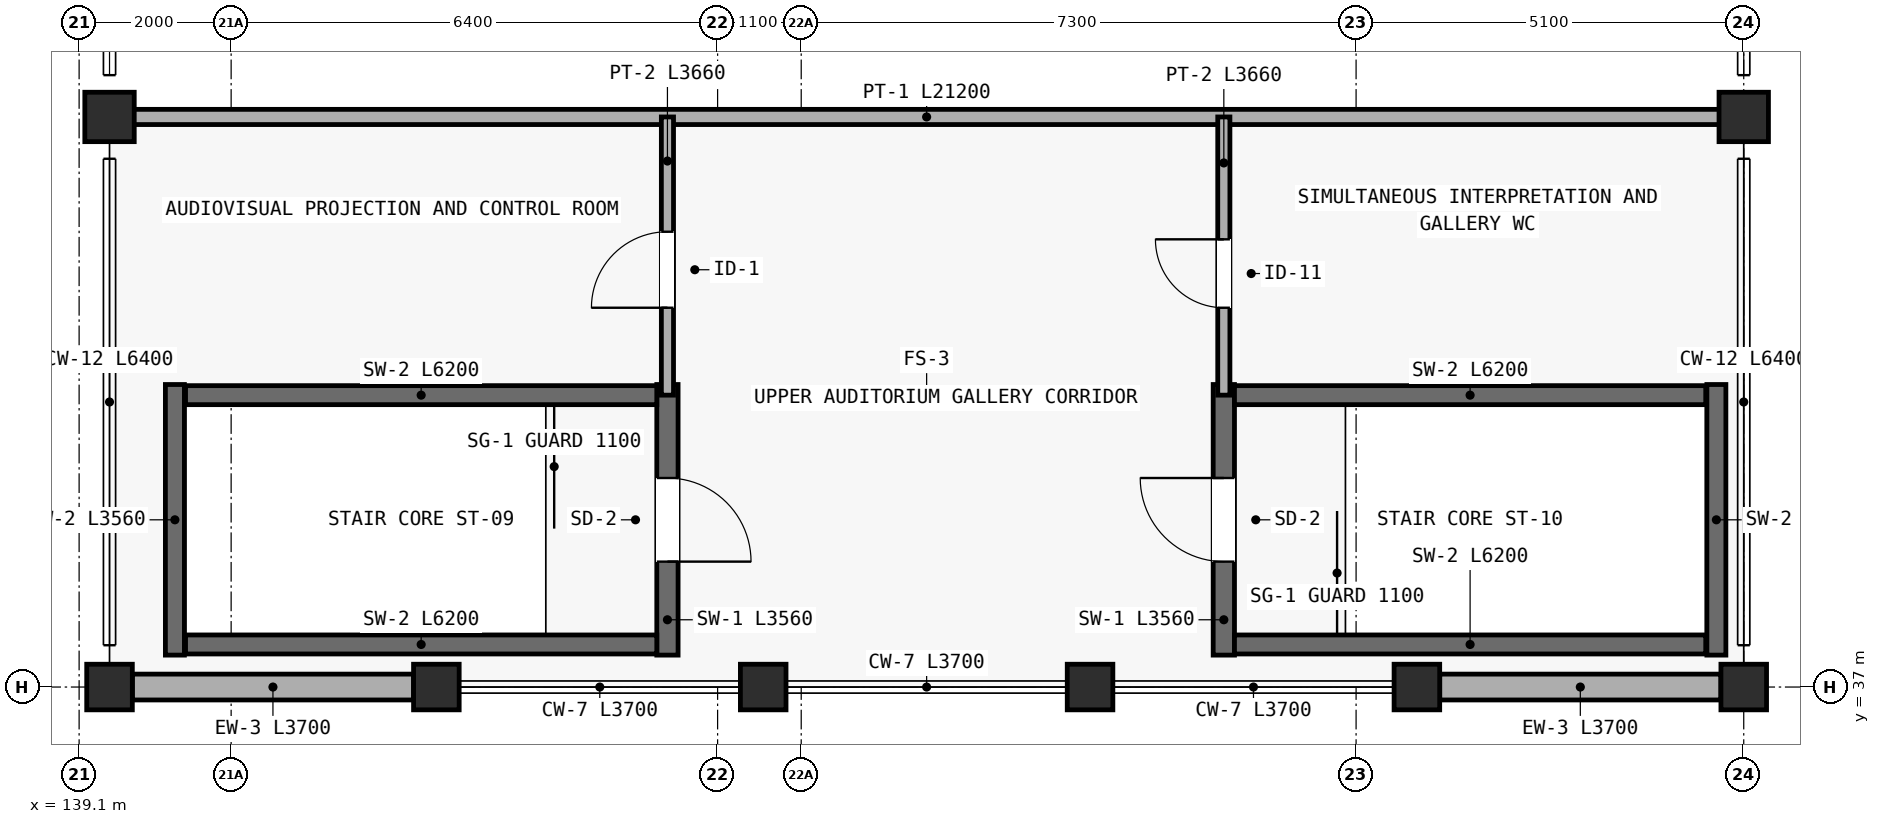
"""IFC4 building model, lengths in metres.
Left out: names, types, materials, properties, quantities, classifications, styles, units other than length and angle.
Written with IfcOpenShell. Run it as: python <this file> out.ifc"""

import sys

from ifc_helpers import new_model, si_unit, direction, frame, frame_2d, origin, origin_2d, place, context, subcontext, project, spatial, rectangle, extrude, element, fill, save


model = new_model("IFC4")
c1 = context("Model", 3, precision=1e-05, world=origin(), true_north=direction((0.0, 1.0)))
c2 = subcontext(c1, "Body", "Model", "MODEL_VIEW")
j1 = project(units=[si_unit("LENGTHUNIT", "METRE"), si_unit("PLANEANGLEUNIT", "RADIAN")], contexts=[c1])
p1 = place(None, origin())
s1 = spatial("IfcSite", under=j1, at=p1, CompositionType="ELEMENT")
p2 = place(p1, origin())
s2 = spatial("IfcBuilding", under=s1, at=p2, CompositionType="ELEMENT")
p3 = place(p2, frame((0.0, 0.0, 5.85)))
s3 = spatial("IfcBuildingStorey", under=s2, at=p3, CompositionType="ELEMENT", Elevation=5.85)
for number, where, z_axis, x_axis in (
    (1, (139.5, 37.0, 0.0), (0.0, 0.0, 1.0), (1.0, 0.0, 0.0)),
    (2, (143.8, 37.0, 0.0), (0.0, 0.0, 1.0), (1.0, 0.0, 0.0)),
    (3, (148.1, 37.0, 0.0), (0.0, 0.0, 1.0), (1.0, 0.0, 0.0)),
    (4, (152.4, 37.0, 0.0), (0.0, 0.0, 1.0), (1.0, 0.0, 0.0)),
    (5, (156.7, 37.0, 0.0), (0.0, 0.0, 1.0), (1.0, 0.0, 0.0)),
    (6, (161.0, 37.0, 0.0), (0.0, 0.0, 1.0), (1.0, 0.0, 0.0)),
):
    element("IfcColumn", number, at=place(p3, frame(where, z_axis=z_axis, x_axis=x_axis)), inside=s3, PredefinedType="COLUMN", context=c2, shape_type="SweptSolid", body=[
        extrude(rectangle(XDim=0.6, YDim=0.6, at=origin_2d()), origin(), (0.0, 0.0, 1.0), 3.45),
    ])
for number, where, z_axis, x_axis in (
    (7, (139.5, 44.5, 0.0), (0.0, 0.0, 1.0), (1.0, 0.0, 0.0)),
    (8, (161.0, 44.5, 0.0), (0.0, 0.0, 1.0), (1.0, 0.0, 0.0)),
):
    element("IfcColumn", number, at=place(p3, frame(where, z_axis=z_axis, x_axis=x_axis)), inside=s3, PredefinedType="COLUMN", context=c2, shape_type="SweptSolid", body=[
        extrude(rectangle(XDim=0.65, YDim=0.65, at=origin_2d()), origin(), (0.0, 0.0, 1.0), 3.45),
    ])
for number, where, z_axis, x_axis in (
    (9, (139.8, 37.0, 0.0), (0.0, 0.0, 1.0), (1.0, 0.0, 0.0)),
    (10, (157.0, 37.0, 0.0), (0.0, 0.0, 1.0), (1.0, 0.0, 0.0)),
):
    element("IfcWall", number, at=place(p3, frame(where, z_axis=z_axis, x_axis=x_axis)), inside=s3, PredefinedType="STANDARD", context=c2, shape_type="SweptSolid", body=[
        extrude(rectangle(XDim=3.7, YDim=0.34, at=frame_2d((1.85, 0.0))), origin(), (0.0, 0.0, 1.0), 2.5),
    ])
p4 = place(p3, frame((146.84, 40.98, 0.0), z_axis=(0.0, 0.0, 1.0), x_axis=(0.0, -1.0, 0.0)))
e11 = element("IfcWall", 11, at=p4, inside=s3, PredefinedType="SHEAR", context=c2, shape_type="SweptSolid", body=[
    extrude(rectangle(XDim=3.56, YDim=0.28, at=frame_2d((1.78, 0.0))), origin(), (0.0, 0.0, 1.0), 3.3),
])
p5 = place(p4, frame((1.23, 0.0, 0.0)))
e12 = element("IfcOpeningElement", 12, at=p5, cuts=e11, PredefinedType="OPENING", context=c2, shape_type="SweptSolid", body=[
    extrude(rectangle(XDim=1.1, YDim=2.15, at=frame_2d((0.55, 1.075))), frame((0.0, 0.15, 0.0), z_axis=(0.0, -1.0, 0.0), x_axis=(1.0, 0.0, 0.0)), (0.0, 0.0, 1.0), 0.3),
])
p6 = place(p3, frame((140.36, 37.42, 0.0), z_axis=(0.0, 0.0, 1.0), x_axis=(0.0, 1.0, 0.0)))
e13 = element("IfcWall", 13, at=p6, inside=s3, PredefinedType="SHEAR", context=c2, shape_type="SweptSolid", body=[
    extrude(rectangle(XDim=3.56, YDim=0.25, at=frame_2d((1.78, 0.0))), origin(), (0.0, 0.0, 1.0), 3.3),
])
for number, where, z_axis, x_axis in (
    (14, (146.7, 40.84, 0.0), (0.0, 0.0, 1.0), (-1.0, 0.0, 0.0)),
    (15, (140.5, 37.56, 0.0), (0.0, 0.0, 1.0), (1.0, 0.0, 0.0)),
):
    element("IfcWall", number, at=place(p3, frame(where, z_axis=z_axis, x_axis=x_axis)), inside=s3, PredefinedType="SHEAR", context=c2, shape_type="SweptSolid", body=[
        extrude(rectangle(XDim=6.2, YDim=0.25, at=frame_2d((3.1, 0.0))), origin(), (0.0, 0.0, 1.0), 3.3),
    ])
p7 = place(p3, frame((154.16, 37.42, 0.0), z_axis=(0.0, 0.0, 1.0), x_axis=(0.0, 1.0, 0.0)))
e16 = element("IfcWall", 16, at=p7, inside=s3, PredefinedType="SHEAR", context=c2, shape_type="SweptSolid", body=[
    extrude(rectangle(XDim=3.56, YDim=0.28, at=frame_2d((1.78, 0.0))), origin(), (0.0, 0.0, 1.0), 3.3),
])
p8 = place(p7, frame((1.23, 0.0, 0.0)))
e17 = element("IfcOpeningElement", 17, at=p8, cuts=e16, PredefinedType="OPENING", context=c2, shape_type="SweptSolid", body=[
    extrude(rectangle(XDim=1.1, YDim=2.15, at=frame_2d((0.55, 1.075))), frame((0.0, 0.15, 0.0), z_axis=(0.0, -1.0, 0.0), x_axis=(1.0, 0.0, 0.0)), (0.0, 0.0, 1.0), 0.3),
])
p9 = place(p3, frame((160.64, 40.98, 0.0), z_axis=(0.0, 0.0, 1.0), x_axis=(0.0, -1.0, 0.0)))
e18 = element("IfcWall", 18, at=p9, inside=s3, PredefinedType="SHEAR", context=c2, shape_type="SweptSolid", body=[
    extrude(rectangle(XDim=3.56, YDim=0.25, at=frame_2d((1.78, 0.0))), origin(), (0.0, 0.0, 1.0), 3.3),
])
for number, where, z_axis, x_axis in (
    (19, (154.3, 37.56, 0.0), (0.0, 0.0, 1.0), (1.0, 0.0, 0.0)),
    (20, (160.5, 40.84, 0.0), (0.0, 0.0, 1.0), (-1.0, 0.0, 0.0)),
):
    element("IfcWall", number, at=place(p3, frame(where, z_axis=z_axis, x_axis=x_axis)), inside=s3, PredefinedType="SHEAR", context=c2, shape_type="SweptSolid", body=[
        extrude(rectangle(XDim=6.2, YDim=0.25, at=frame_2d((3.1, 0.0))), origin(), (0.0, 0.0, 1.0), 3.3),
    ])
p10 = place(p3, frame((139.65, 44.5, 0.0), z_axis=(0.0, 0.0, 1.0), x_axis=(1.0, 0.0, 0.0)))
e21 = element("IfcWall", 21, at=p10, inside=s3, PredefinedType="PARTITIONING", context=c2, shape_type="SweptSolid", body=[
    extrude(rectangle(XDim=21.2, YDim=0.2, at=frame_2d((10.6, 0.0))), origin(), (0.0, 0.0, 1.0), 2.5),
])
p11 = place(p3, frame((146.84, 40.84, 0.0), z_axis=(0.0, 0.0, 1.0), x_axis=(0.0, 1.0, 0.0)))
e22 = element("IfcWall", 22, at=p11, inside=s3, PredefinedType="PARTITIONING", context=c2, shape_type="SweptSolid", body=[
    extrude(rectangle(XDim=3.66, YDim=0.16, at=frame_2d((1.83, 0.0))), origin(), (0.0, 0.0, 1.0), 2.5),
])
p12 = place(p11, frame((1.15, 0.0, 0.0)))
e23 = element("IfcOpeningElement", 23, at=p12, cuts=e22, PredefinedType="OPENING", context=c2, shape_type="SweptSolid", body=[
    extrude(rectangle(XDim=1.0, YDim=2.12, at=frame_2d((0.5, 1.06))), frame((0.0, 0.09, 0.0), z_axis=(0.0, -1.0, 0.0), x_axis=(1.0, 0.0, 0.0)), (0.0, 0.0, 1.0), 0.18),
])
p13 = place(p3, frame((154.16, 40.84, 0.0), z_axis=(0.0, 0.0, 1.0), x_axis=(0.0, 1.0, 0.0)))
e24 = element("IfcWall", 24, at=p13, inside=s3, PredefinedType="PARTITIONING", context=c2, shape_type="SweptSolid", body=[
    extrude(rectangle(XDim=3.66, YDim=0.16, at=frame_2d((1.83, 0.0))), origin(), (0.0, 0.0, 1.0), 2.5),
])
p14 = place(p13, frame((1.15, 0.0, 0.0)))
e25 = element("IfcOpeningElement", 25, at=p14, cuts=e24, PredefinedType="OPENING", context=c2, shape_type="SweptSolid", body=[
    extrude(rectangle(XDim=0.9, YDim=2.08, at=frame_2d((0.45, 1.04))), frame((0.0, 0.09, 0.0), z_axis=(0.0, -1.0, 0.0), x_axis=(1.0, 0.0, 0.0)), (0.0, 0.0, 1.0), 0.18),
])
p15 = place(p5, origin())
e26 = element("IfcDoor", 26, at=p15, inside=s3, OperationType="SINGLE_SWING_RIGHT", PredefinedType="DOOR", context=c2, shape_type="SweptSolid", body=[
    extrude(rectangle(XDim=1.1, YDim=2.15, at=frame_2d((0.55, 1.075))), frame((0.0, 0.025, 0.0), z_axis=(0.0, -1.0, 0.0), x_axis=(1.0, 0.0, 0.0)), (0.0, 0.0, 1.0), 0.05),
])
fill(e12, e26)
p16 = place(p8, origin())
e27 = element("IfcDoor", 27, at=p16, inside=s3, OperationType="SINGLE_SWING_RIGHT", PredefinedType="DOOR", context=c2, shape_type="SweptSolid", body=[
    extrude(rectangle(XDim=1.1, YDim=2.15, at=frame_2d((0.55, 1.075))), frame((0.0, 0.025, 0.0), z_axis=(0.0, -1.0, 0.0), x_axis=(1.0, 0.0, 0.0)), (0.0, 0.0, 1.0), 0.05),
])
fill(e17, e27)
p17 = place(p12, origin())
e28 = element("IfcDoor", 28, at=p17, inside=s3, OperationType="SINGLE_SWING_LEFT", PredefinedType="DOOR", context=c2, shape_type="SweptSolid", body=[
    extrude(rectangle(XDim=1.0, YDim=2.12, at=frame_2d((0.5, 1.06))), frame((0.0, 0.025, 0.0), z_axis=(0.0, -1.0, 0.0), x_axis=(1.0, 0.0, 0.0)), (0.0, 0.0, 1.0), 0.05),
])
fill(e23, e28)
p18 = place(p14, origin())
e29 = element("IfcDoor", 29, at=p18, inside=s3, OperationType="SINGLE_SWING_RIGHT", PredefinedType="DOOR", context=c2, shape_type="SweptSolid", body=[
    extrude(rectangle(XDim=0.9, YDim=2.08, at=frame_2d((0.45, 1.04))), frame((0.0, 0.025, 0.0), z_axis=(0.0, -1.0, 0.0), x_axis=(1.0, 0.0, 0.0)), (0.0, 0.0, 1.0), 0.05),
])
fill(e25, e29)
save(model, sys.argv[1])
